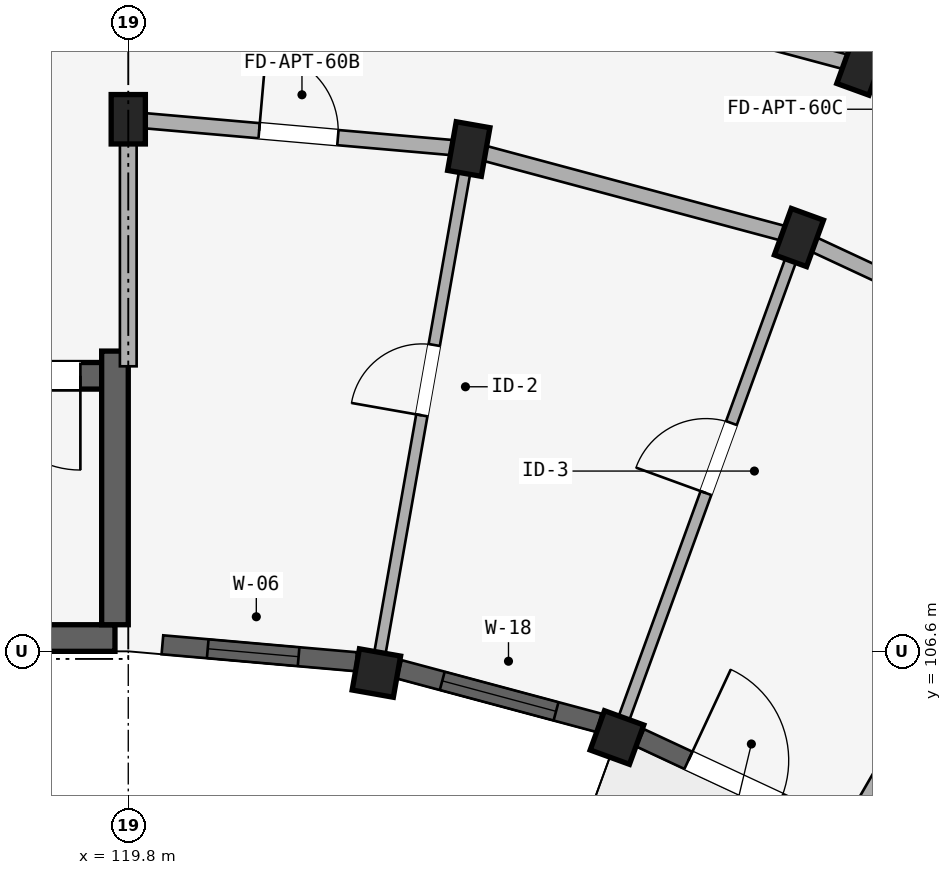
"""IFC4 building model, lengths in metres.
Left out: names, types, materials, properties, quantities, classifications, styles, units other than length and angle.
Written with IfcOpenShell. Run it as: python <this file> out.ifc"""

import sys

from ifc_helpers import new_model, si_unit, direction, frame, frame_2d, origin, origin_2d, place, context, subcontext, project, spatial, rectangle, extrude, element, fill, save


model = new_model("IFC4")
c1 = context("Model", 3, precision=1e-05, world=origin(), true_north=direction((0.0, 1.0)))
c2 = subcontext(c1, "Body", "Model", "MODEL_VIEW")
j1 = project(units=[si_unit("LENGTHUNIT", "METRE"), si_unit("PLANEANGLEUNIT", "RADIAN")], contexts=[c1])
p1 = place(None, origin())
s1 = spatial("IfcSite", under=j1, at=p1, CompositionType="ELEMENT")
p2 = place(p1, origin())
s2 = spatial("IfcBuilding", under=s1, at=p2, CompositionType="ELEMENT")
p3 = place(p2, frame((0.0, 0.0, 37.05)))
s3 = spatial("IfcBuildingStorey", under=s2, at=p3, CompositionType="ELEMENT", Elevation=37.05)
p4 = place(p3, frame((119.625, 106.775, 0.0), z_axis=(0.0, 0.0, 1.0), x_axis=(-1.0, 0.0, 0.0)))
e1 = element("IfcWall", 1, at=p4, inside=s3, PredefinedType="SHEAR", context=c2, shape_type="SweptSolid", body=[
    extrude(rectangle(XDim=8.25, YDim=0.35, at=frame_2d((4.125, 0.0))), origin(), (0.0, 0.0, 1.0), 2.93),
])
p5 = place(p3, frame((119.45, 110.225, 0.0), z_axis=(0.0, 0.0, 1.0), x_axis=(-1.0, 0.0, 0.0)))
e2 = element("IfcWall", 2, at=p5, inside=s3, PredefinedType="SHEAR", context=c2, shape_type="SweptSolid", body=[
    extrude(rectangle(XDim=7.9, YDim=0.35, at=frame_2d((3.95, 0.0))), origin(), (0.0, 0.0, 1.0), 2.93),
])
p6 = place(p5, frame((0.28, 0.0, 0.0)))
e3 = element("IfcOpeningElement", 3, at=p6, cuts=e2, PredefinedType="OPENING", context=c2, shape_type="SweptSolid", body=[
    extrude(rectangle(XDim=1.24, YDim=2.15, at=frame_2d((0.62, 1.075))), frame((0.0, 0.185, 0.0), z_axis=(0.0, -1.0, 0.0), x_axis=(1.0, 0.0, 0.0)), (0.0, 0.0, 1.0), 0.37),
])
p7 = place(p3, frame((119.625, 106.95, 0.0), z_axis=(0.0, 0.0, 1.0), x_axis=(0.0, 1.0, 0.0)))
e4 = element("IfcWall", 4, at=p7, inside=s3, PredefinedType="SHEAR", context=c2, shape_type="SweptSolid", body=[
    extrude(rectangle(XDim=3.6, YDim=0.35, at=frame_2d((1.8, 0.0))), origin(), (0.0, 0.0, 1.0), 2.93),
])
p8 = place(p3, frame((119.8, 113.6, 0.0), z_axis=(0.0, 0.0, 1.0), x_axis=(1.0, 0.0, 0.0)))
e5 = element("IfcColumn", 5, at=p8, inside=s3, PredefinedType="COLUMN", context=c2, shape_type="SweptSolid", body=[
    extrude(rectangle(XDim=0.45, YDim=0.65, at=origin_2d()), origin(), (0.0, 0.0, 1.0), 2.93),
])
p9 = place(p3, frame((123.065, 106.314, 0.0), z_axis=(0.0, 0.0, 1.0), x_axis=(-0.984807753012, 0.173648177667, 0.0)))
e6 = element("IfcColumn", 6, at=p9, inside=s3, PredefinedType="COLUMN", context=c2, shape_type="SweptSolid", body=[
    extrude(rectangle(XDim=0.55, YDim=0.55, at=origin_2d()), origin(), (0.0, 0.0, 1.0), 2.93),
])
p10 = place(p3, frame((124.28, 113.208, 0.0), z_axis=(0.0, 0.0, 1.0), x_axis=(-0.984807753012, 0.173648177667, 0.0)))
e7 = element("IfcColumn", 7, at=p10, inside=s3, PredefinedType="COLUMN", context=c2, shape_type="SweptSolid", body=[
    extrude(rectangle(XDim=0.45, YDim=0.65, at=origin_2d()), origin(), (0.0, 0.0, 1.0), 2.93),
])
p11 = place(p3, frame((126.23, 105.466, 0.0), z_axis=(0.0, 0.0, 1.0), x_axis=(-0.939692620786, 0.342020143326, 0.0)))
e8 = element("IfcColumn", 8, at=p11, inside=s3, PredefinedType="COLUMN", context=c2, shape_type="SweptSolid", body=[
    extrude(rectangle(XDim=0.55, YDim=0.55, at=origin_2d()), origin(), (0.0, 0.0, 1.0), 2.93),
])
for number, where, z_axis, x_axis in (
    (9, (128.624, 112.044, 0.0), (0.0, 0.0, 1.0), (-0.94, 0.342, 0.0)),
    (10, (129.445, 114.299, 0.0), (0.0, 0.0, 1.0), (-0.94, 0.342, 0.0)),
):
    element("IfcColumn", number, at=place(p3, frame(where, z_axis=z_axis, x_axis=x_axis)), inside=s3, PredefinedType="COLUMN", context=c2, shape_type="SweptSolid", body=[
        extrude(rectangle(XDim=0.45, YDim=0.65, at=origin_2d()), origin(), (0.0, 0.0, 1.0), 2.93),
    ])
p12 = place(p3, frame((119.8, 113.6, 0.0), z_axis=(0.0, 0.0, 1.0), x_axis=(0.996191949488, -0.087187153726, 0.0)))
e11 = element("IfcWall", 11, at=p12, inside=s3, PredefinedType="STANDARD", context=c2, shape_type="SweptSolid", body=[
    extrude(rectangle(XDim=4.497, YDim=0.2, at=frame_2d((2.249, 0.0))), origin(), (0.0, 0.0, 1.0), 2.372),
])
p13 = place(p12, frame((1.729, 0.0, 0.0)))
e12 = element("IfcOpeningElement", 12, at=p13, cuts=e11, PredefinedType="OPENING", context=c2, shape_type="SweptSolid", body=[
    extrude(rectangle(XDim=1.04, YDim=2.15, at=frame_2d((0.52, 1.075))), frame((0.0, 0.11, 0.0), z_axis=(0.0, -1.0, 0.0), x_axis=(1.0, 0.0, 0.0)), (0.0, 0.0, 1.0), 0.22),
])
p14 = place(p3, frame((124.28, 113.208, 0.0), z_axis=(0.0, 0.0, 1.0), x_axis=(0.965934240054, -0.258787642463, 0.0)))
e13 = element("IfcWall", 13, at=p14, inside=s3, PredefinedType="STANDARD", context=c2, shape_type="SweptSolid", body=[
    extrude(rectangle(XDim=4.497, YDim=0.2, at=frame_2d((2.249, 0.0))), origin(), (0.0, 0.0, 1.0), 2.372),
])
p15 = place(p3, frame((124.697, 115.572, 0.0), z_axis=(0.0, 0.0, 1.0), x_axis=(0.965930095386, -0.258803112091, 0.0)))
e14 = element("IfcWall", 14, at=p15, inside=s3, PredefinedType="STANDARD", context=c2, shape_type="SweptSolid", body=[
    extrude(rectangle(XDim=4.916, YDim=0.2, at=frame_2d((2.458, 0.0))), origin(), (0.0, 0.0, 1.0), 2.372),
])
p16 = place(p3, frame((128.624, 112.044, 0.0), z_axis=(0.0, 0.0, 1.0), x_axis=(0.906307919131, -0.422617978463, 0.0)))
e15 = element("IfcWall", 15, at=p16, inside=s3, PredefinedType="STANDARD", context=c2, shape_type="SweptSolid", body=[
    extrude(rectangle(XDim=4.497, YDim=0.2, at=frame_2d((2.249, 0.0))), origin(), (0.0, 0.0, 1.0), 2.372),
])
p17 = place(p3, frame((129.445, 114.299, 0.0), z_axis=(0.0, 0.0, 1.0), x_axis=(0.906302381024, -0.422629854778, 0.0)))
e16 = element("IfcWall", 16, at=p17, inside=s3, PredefinedType="STANDARD", context=c2, shape_type="SweptSolid", body=[
    extrude(rectangle(XDim=4.915, YDim=0.2, at=frame_2d((2.458, 0.0))), origin(), (0.0, 0.0, 1.0), 2.372),
])
p18 = place(p17, frame((1.918, 0.0, 0.0)))
e17 = element("IfcOpeningElement", 17, at=p18, cuts=e16, PredefinedType="OPENING", context=c2, shape_type="SweptSolid", body=[
    extrude(rectangle(XDim=1.08, YDim=2.15, at=frame_2d((0.54, 1.075))), frame((0.0, 0.11, 0.0), z_axis=(0.0, -1.0, 0.0), x_axis=(1.0, 0.0, 0.0)), (0.0, 0.0, 1.0), 0.22),
])
p19 = place(p3, frame((119.8, 110.35, 0.0), z_axis=(0.0, 0.0, 1.0), x_axis=(0.0, 1.0, 0.0)))
e18 = element("IfcWall", 18, at=p19, inside=s3, PredefinedType="STANDARD", context=c2, shape_type="SweptSolid", body=[
    extrude(rectangle(XDim=3.2, YDim=0.22, at=frame_2d((1.6, 0.0))), origin(), (0.0, 0.0, 1.0), 2.372),
])
p20 = place(p3, frame((123.099, 106.511, 0.0), z_axis=(0.0, 0.0, 1.0), x_axis=(0.173647089161, 0.984807944945, 0.0)))
e19 = element("IfcWall", 19, at=p20, inside=s3, PredefinedType="PARTITIONING", context=c2, shape_type="SweptSolid", body=[
    extrude(rectangle(XDim=6.75, YDim=0.15, at=frame_2d((3.375, 0.0))), origin(), (0.0, 0.0, 1.0), 2.372),
])
p21 = place(p20, frame((3.242, 0.0, 0.0)))
e20 = element("IfcOpeningElement", 20, at=p21, cuts=e19, PredefinedType="OPENING", context=c2, shape_type="SweptSolid", body=[
    extrude(rectangle(XDim=0.94, YDim=2.1, at=frame_2d((0.47, 1.05))), frame((0.0, 0.085, 0.0), z_axis=(0.0, -1.0, 0.0), x_axis=(1.0, 0.0, 0.0)), (0.0, 0.0, 1.0), 0.17),
])
p22 = place(p3, frame((126.298, 105.654, 0.0), z_axis=(0.0, 0.0, 1.0), x_axis=(0.342010221662, 0.939696231917, 0.0)))
e21 = element("IfcWall", 21, at=p22, inside=s3, PredefinedType="PARTITIONING", context=c2, shape_type="SweptSolid", body=[
    extrude(rectangle(XDim=6.75, YDim=0.15, at=frame_2d((3.375, 0.0))), origin(), (0.0, 0.0, 1.0), 2.372),
])
p23 = place(p22, frame((3.222, 0.0, 0.0)))
e22 = element("IfcOpeningElement", 22, at=p23, cuts=e21, PredefinedType="OPENING", context=c2, shape_type="SweptSolid", body=[
    extrude(rectangle(XDim=0.98, YDim=2.12, at=frame_2d((0.49, 1.06))), frame((0.0, 0.085, 0.0), z_axis=(0.0, -1.0, 0.0), x_axis=(1.0, 0.0, 0.0)), (0.0, 0.0, 1.0), 0.17),
])
p24 = place(p3, frame((129.479, 114.393, 0.0), z_axis=(0.0, 0.0, 1.0), x_axis=(0.342012528828, 0.939695392201, 0.0)))
e23 = element("IfcWall", 23, at=p24, inside=s3, PredefinedType="STANDARD", context=c2, shape_type="SweptSolid", body=[
    extrude(rectangle(XDim=9.02, YDim=0.22, at=frame_2d((4.51, 0.0))), origin(), (0.0, 0.0, 1.0), 2.372),
])
p25 = place(p3, frame((129.3, 104.254, 0.0), z_axis=(0.0, 0.0, 1.0), x_axis=(0.499997969693, 0.866026575979, 0.0)))
e24 = element("IfcWall", 24, at=p25, inside=s3, PredefinedType="STANDARD", context=c2, shape_type="SweptSolid", body=[
    extrude(rectangle(XDim=6.75, YDim=0.22, at=frame_2d((3.375, 0.0))), origin(), (0.0, 0.0, 1.0), 2.372),
])
p26 = place(p3, frame((120.249, 106.686, 0.0), z_axis=(0.0, 0.0, 1.0), x_axis=(0.996188847542, -0.087222589008, 0.0)))
e25 = element("IfcWall", 25, at=p26, inside=s3, PredefinedType="STANDARD", context=c2, shape_type="SweptSolid", body=[
    extrude(rectangle(XDim=2.558, YDim=0.25, at=frame_2d((1.279, 0.0))), origin(), (0.0, 0.0, 1.0), 2.422),
])
p27 = place(p26, frame((0.599, 0.0, 0.722)))
e26 = element("IfcOpeningElement", 26, at=p27, cuts=e25, PredefinedType="OPENING", context=c2, shape_type="SweptSolid", body=[
    extrude(rectangle(XDim=1.2, YDim=1.5, at=frame_2d((0.6, 0.75))), frame((0.0, 0.135, 0.0), z_axis=(0.0, -1.0, 0.0), x_axis=(1.0, 0.0, 0.0)), (0.0, 0.0, 1.0), 0.27),
])
p28 = place(p3, frame((123.366, 106.363, 0.0), z_axis=(0.0, 0.0, 1.0), x_axis=(0.965928818058, -0.258807879411, 0.0)))
e27 = element("IfcWall", 27, at=p28, inside=s3, PredefinedType="STANDARD", context=c2, shape_type="SweptSolid", body=[
    extrude(rectangle(XDim=2.72, YDim=0.25, at=frame_2d((1.36, 0.0))), origin(), (0.0, 0.0, 1.0), 2.422),
])
p29 = place(p28, frame((0.585, 0.0, 0.622)))
e28 = element("IfcOpeningElement", 28, at=p29, cuts=e27, PredefinedType="OPENING", context=c2, shape_type="SweptSolid", body=[
    extrude(rectangle(XDim=1.55, YDim=1.6, at=frame_2d((0.775, 0.8))), frame((0.0, 0.135, 0.0), z_axis=(0.0, -1.0, 0.0), x_axis=(1.0, 0.0, 0.0)), (0.0, 0.0, 1.0), 0.27),
])
p30 = place(p3, frame((126.535, 105.462, 0.0), z_axis=(0.0, 0.0, 1.0), x_axis=(0.906302358412, -0.422629903269, 0.0)))
e29 = element("IfcWall", 29, at=p30, inside=s3, PredefinedType="STANDARD", context=c2, shape_type="SweptSolid", body=[
    extrude(rectangle(XDim=2.72, YDim=0.25, at=frame_2d((1.36, 0.0))), origin(), (0.0, 0.0, 1.0), 2.422),
])
p31 = place(p30, frame((0.7, 0.0, 0.0)))
e30 = element("IfcOpeningElement", 30, at=p31, cuts=e29, PredefinedType="OPENING", context=c2, shape_type="SweptSolid", body=[
    extrude(rectangle(XDim=1.32, YDim=2.15, at=frame_2d((0.66, 1.075))), frame((0.0, 0.135, 0.0), z_axis=(0.0, -1.0, 0.0), x_axis=(1.0, 0.0, 0.0)), (0.0, 0.0, 1.0), 0.27),
])
p32 = place(p27, origin())
e31 = element("IfcWindow", 31, at=p32, inside=s3, PartitioningType="SINGLE_PANEL", PredefinedType="WINDOW", context=c2, shape_type="SweptSolid", body=[
    extrude(rectangle(XDim=1.2, YDim=1.5, at=frame_2d((0.6, 0.75))), frame((0.0, 0.03, 0.0), z_axis=(0.0, -1.0, 0.0), x_axis=(1.0, 0.0, 0.0)), (0.0, 0.0, 1.0), 0.06),
])
fill(e26, e31)
p33 = place(p29, origin())
e32 = element("IfcWindow", 32, at=p33, inside=s3, PartitioningType="DOUBLE_PANEL_VERTICAL", PredefinedType="WINDOW", context=c2, shape_type="SweptSolid", body=[
    extrude(rectangle(XDim=1.55, YDim=1.6, at=frame_2d((0.775, 0.8))), frame((0.0, 0.03, 0.0), z_axis=(0.0, -1.0, 0.0), x_axis=(1.0, 0.0, 0.0)), (0.0, 0.0, 1.0), 0.06),
])
fill(e28, e32)
p34 = place(p6, origin())
e33 = element("IfcDoor", 33, at=p34, inside=s3, OperationType="SINGLE_SWING_LEFT", PredefinedType="DOOR", context=c2, shape_type="SweptSolid", body=[
    extrude(rectangle(XDim=1.24, YDim=2.15, at=frame_2d((0.62, 1.075))), frame((0.0, 0.025, 0.0), z_axis=(0.0, -1.0, 0.0), x_axis=(1.0, 0.0, 0.0)), (0.0, 0.0, 1.0), 0.05),
])
fill(e3, e33)
p35 = place(p21, origin())
e34 = element("IfcDoor", 34, at=p35, inside=s3, OperationType="SINGLE_SWING_LEFT", PredefinedType="DOOR", context=c2, shape_type="SweptSolid", body=[
    extrude(rectangle(XDim=0.94, YDim=2.1, at=frame_2d((0.47, 1.05))), frame((0.0, 0.025, 0.0), z_axis=(0.0, -1.0, 0.0), x_axis=(1.0, 0.0, 0.0)), (0.0, 0.0, 1.0), 0.05),
])
fill(e20, e34)
p36 = place(p23, origin())
e35 = element("IfcDoor", 35, at=p36, inside=s3, OperationType="SINGLE_SWING_LEFT", PredefinedType="DOOR", context=c2, shape_type="SweptSolid", body=[
    extrude(rectangle(XDim=0.98, YDim=2.12, at=frame_2d((0.49, 1.06))), frame((0.0, 0.025, 0.0), z_axis=(0.0, -1.0, 0.0), x_axis=(1.0, 0.0, 0.0)), (0.0, 0.0, 1.0), 0.05),
])
fill(e22, e35)
p37 = place(p13, frame((1.04, 0.0, 0.0), z_axis=(0.0, 0.0, 1.0), x_axis=(-1.0, 0.0, 0.0)))
e36 = element("IfcDoor", 36, at=p37, inside=s3, OperationType="SINGLE_SWING_RIGHT", PredefinedType="DOOR", context=c2, shape_type="SweptSolid", body=[
    extrude(rectangle(XDim=1.04, YDim=2.15, at=frame_2d((0.52, 1.075))), frame((0.0, 0.025, 0.0), z_axis=(0.0, -1.0, 0.0), x_axis=(1.0, 0.0, 0.0)), (0.0, 0.0, 1.0), 0.05),
])
fill(e12, e36)
p38 = place(p31, frame((1.32, 0.0, 0.0), z_axis=(0.0, 0.0, 1.0), x_axis=(-1.0, 0.0, 0.0)))
e37 = element("IfcDoor", 37, at=p38, inside=s3, OperationType="SINGLE_SWING_RIGHT", PredefinedType="DOOR", context=c2, shape_type="SweptSolid", body=[
    extrude(rectangle(XDim=1.32, YDim=2.15, at=frame_2d((0.66, 1.075))), frame((0.0, 0.025, 0.0), z_axis=(0.0, -1.0, 0.0), x_axis=(1.0, 0.0, 0.0)), (0.0, 0.0, 1.0), 0.05),
])
fill(e30, e37)
save(model, sys.argv[1])
